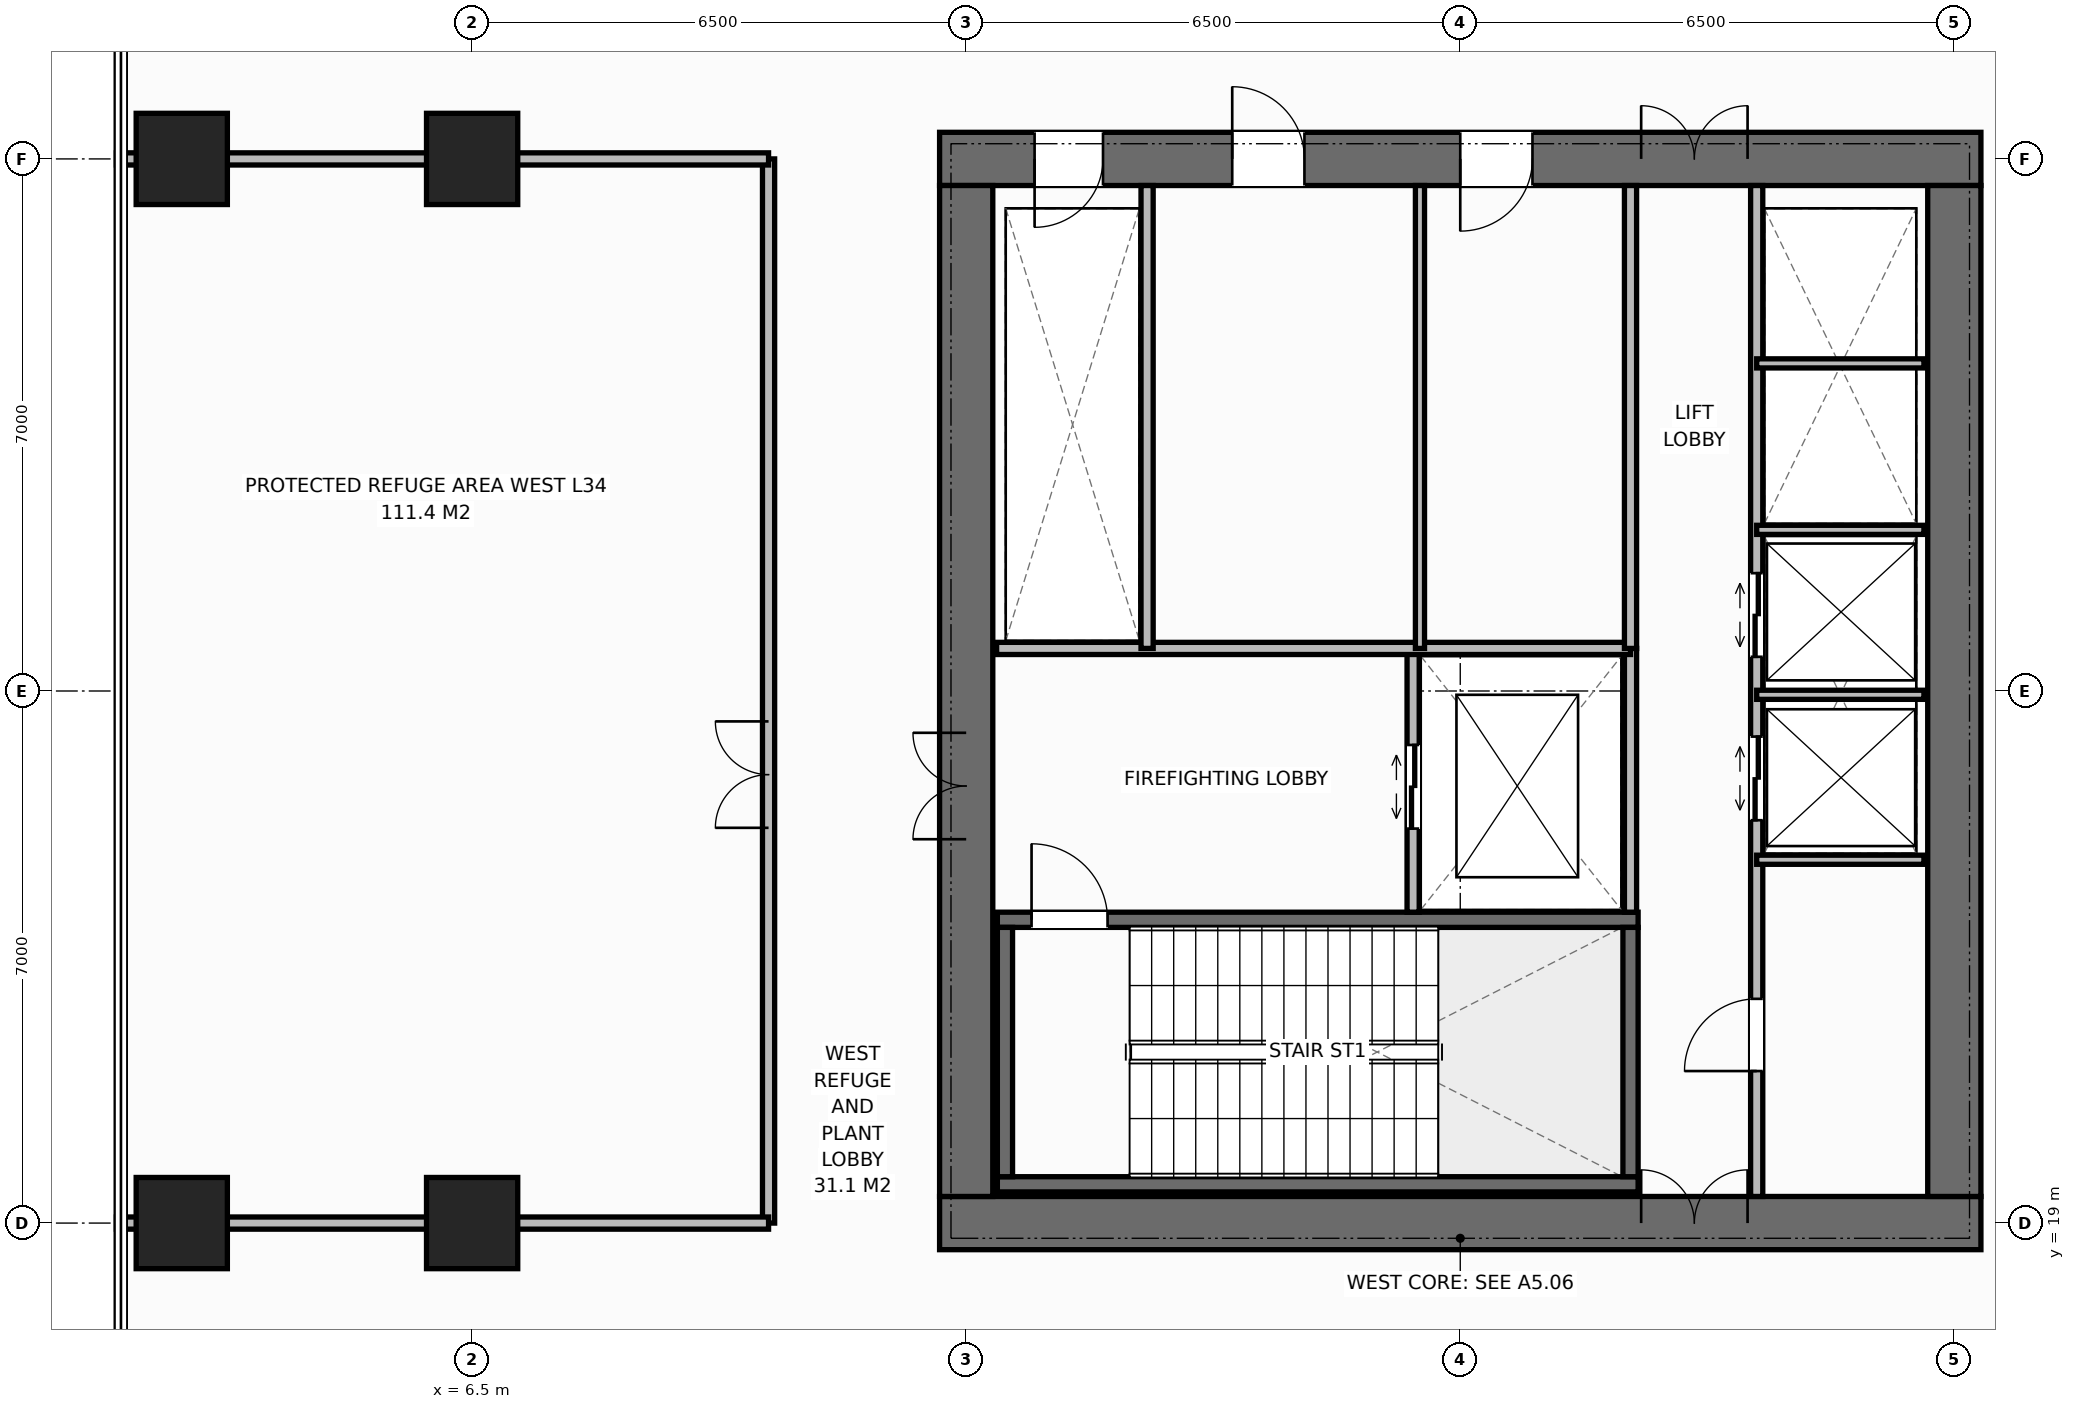
"""IFC4 building model, lengths in metres.
Left out: names, types, materials, properties, quantities, classifications, styles, units other than length and angle.
Written with IfcOpenShell. Run it as: python <this file> out.ifc"""

import sys

from ifc_helpers import new_model, si_unit, direction, frame, frame_2d, origin, origin_2d, place, context, subcontext, project, spatial, rectangle, extrude, element, fill, save


model = new_model("IFC4")
c1 = context("Model", 3, precision=1e-05, world=origin(), true_north=direction((0.0, 1.0)))
c2 = subcontext(c1, "Body", "Model", "MODEL_VIEW")
j1 = project(units=[si_unit("LENGTHUNIT", "METRE"), si_unit("PLANEANGLEUNIT", "RADIAN")], contexts=[c1])
p1 = place(None, origin())
s1 = spatial("IfcSite", under=j1, at=p1, CompositionType="ELEMENT")
p2 = place(p1, origin())
s2 = spatial("IfcBuilding", under=s1, at=p2, CompositionType="ELEMENT")
p3 = place(p2, frame((0.0, 0.0, 139.2)))
s3 = spatial("IfcBuildingStorey", under=s2, at=p3, CompositionType="ELEMENT", Elevation=139.2)
p4 = place(p3, frame((12.65, 19.0, 0.0), z_axis=(0.0, 0.0, 1.0), x_axis=(1.0, 0.0, 0.0)))
e1 = element("IfcWall", 1, at=p4, inside=s3, PredefinedType="SHEAR", context=c2, shape_type="SweptSolid", body=[
    extrude(rectangle(XDim=13.7, YDim=0.7, at=frame_2d((6.85, 0.0))), origin(), (0.0, 0.0, 1.0), 5.0),
])
p5 = place(p4, frame((9.23, 0.0, 0.0)))
e2 = element("IfcOpeningElement", 2, at=p5, cuts=e1, PredefinedType="OPENING", context=c2, shape_type="SweptSolid", body=[
    extrude(rectangle(XDim=1.4, YDim=2.2, at=frame_2d((0.7, 1.1))), frame((0.0, 0.36, 0.0), z_axis=(0.0, -1.0, 0.0), x_axis=(1.0, 0.0, 0.0)), (0.0, 0.0, 1.0), 0.72),
])
p6 = place(p3, frame((12.65, 33.0, 0.0), z_axis=(0.0, 0.0, 1.0), x_axis=(1.0, 0.0, 0.0)))
e3 = element("IfcWall", 3, at=p6, inside=s3, PredefinedType="SHEAR", context=c2, shape_type="SweptSolid", body=[
    extrude(rectangle(XDim=13.7, YDim=0.7, at=frame_2d((6.85, 0.0))), origin(), (0.0, 0.0, 1.0), 5.0),
])
p7 = place(p6, frame((1.25, 0.0, 0.0)))
e4 = element("IfcOpeningElement", 4, at=p7, cuts=e3, PredefinedType="OPENING", context=c2, shape_type="SweptSolid", body=[
    extrude(rectangle(XDim=0.9, YDim=2.15, at=frame_2d((0.45, 1.075))), frame((0.0, 0.36, 0.0), z_axis=(0.0, -1.0, 0.0), x_axis=(1.0, 0.0, 0.0)), (0.0, 0.0, 1.0), 0.72),
])
p8 = place(p6, frame((3.85, 0.0, 0.0)))
e5 = element("IfcOpeningElement", 5, at=p8, cuts=e3, PredefinedType="OPENING", context=c2, shape_type="SweptSolid", body=[
    extrude(rectangle(XDim=0.95, YDim=2.15, at=frame_2d((0.475, 1.075))), frame((0.0, 0.36, 0.0), z_axis=(0.0, -1.0, 0.0), x_axis=(1.0, 0.0, 0.0)), (0.0, 0.0, 1.0), 0.72),
])
p9 = place(p6, frame((6.85, 0.0, 0.0)))
e6 = element("IfcOpeningElement", 6, at=p9, cuts=e3, PredefinedType="OPENING", context=c2, shape_type="SweptSolid", body=[
    extrude(rectangle(XDim=0.95, YDim=2.15, at=frame_2d((0.475, 1.075))), frame((0.0, 0.36, 0.0), z_axis=(0.0, -1.0, 0.0), x_axis=(1.0, 0.0, 0.0)), (0.0, 0.0, 1.0), 0.72),
])
p10 = place(p6, frame((9.23, 0.0, 0.0)))
e7 = element("IfcOpeningElement", 7, at=p10, cuts=e3, PredefinedType="OPENING", context=c2, shape_type="SweptSolid", body=[
    extrude(rectangle(XDim=1.4, YDim=2.2, at=frame_2d((0.7, 1.1))), frame((0.0, 0.36, 0.0), z_axis=(0.0, -1.0, 0.0), x_axis=(1.0, 0.0, 0.0)), (0.0, 0.0, 1.0), 0.72),
])
p11 = place(p3, frame((13.0, 19.35, 0.0), z_axis=(0.0, 0.0, 1.0), x_axis=(0.0, 1.0, 0.0)))
e8 = element("IfcWall", 8, at=p11, inside=s3, PredefinedType="SHEAR", context=c2, shape_type="SweptSolid", body=[
    extrude(rectangle(XDim=13.3, YDim=0.7, at=frame_2d((6.65, 0.0))), origin(), (0.0, 0.0, 1.0), 5.0),
])
p12 = place(p11, frame((4.7, 0.0, 0.0)))
e9 = element("IfcOpeningElement", 9, at=p12, cuts=e8, PredefinedType="OPENING", context=c2, shape_type="SweptSolid", body=[
    extrude(rectangle(XDim=1.4, YDim=2.2, at=frame_2d((0.7, 1.1))), frame((0.0, 0.36, 0.0), z_axis=(0.0, -1.0, 0.0), x_axis=(1.0, 0.0, 0.0)), (0.0, 0.0, 1.0), 0.72),
])
p13 = place(p3, frame((26.0, 19.35, 0.0), z_axis=(0.0, 0.0, 1.0), x_axis=(0.0, 1.0, 0.0)))
e10 = element("IfcWall", 10, at=p13, inside=s3, PredefinedType="SHEAR", context=c2, shape_type="SweptSolid", body=[
    extrude(rectangle(XDim=13.3, YDim=0.7, at=frame_2d((6.65, 0.0))), origin(), (0.0, 0.0, 1.0), 5.0),
])
p14 = place(p3, frame((13.41, 19.51, 0.0), z_axis=(0.0, 0.0, 1.0), x_axis=(1.0, 0.0, 0.0)))
e11 = element("IfcWall", 11, at=p14, inside=s3, PredefinedType="SHEAR", context=c2, shape_type="SweptSolid", body=[
    extrude(rectangle(XDim=8.43, YDim=0.2, at=frame_2d((4.215, 0.0))), origin(), (0.0, 0.0, 1.0), 5.0),
])
p15 = place(p3, frame((13.41, 22.99, 0.0), z_axis=(0.0, 0.0, 1.0), x_axis=(1.0, 0.0, 0.0)))
e12 = element("IfcWall", 12, at=p15, inside=s3, PredefinedType="SHEAR", context=c2, shape_type="SweptSolid", body=[
    extrude(rectangle(XDim=8.43, YDim=0.2, at=frame_2d((4.215, 0.0))), origin(), (0.0, 0.0, 1.0), 5.0),
])
p16 = place(p15, frame((0.45, 0.0, 0.0)))
e13 = element("IfcOpeningElement", 13, at=p16, cuts=e12, PredefinedType="OPENING", context=c2, shape_type="SweptSolid", body=[
    extrude(rectangle(XDim=1.0, YDim=2.15, at=frame_2d((0.5, 1.075))), frame((0.0, 0.11, 0.0), z_axis=(0.0, -1.0, 0.0), x_axis=(1.0, 0.0, 0.0)), (0.0, 0.0, 1.0), 0.22),
])
for number, where, z_axis, x_axis in (
    (14, (13.51, 19.61, 0.0), (0.0, 0.0, 1.0), (0.0, 1.0, 0.0)),
    (15, (21.74, 19.61, 0.0), (0.0, 0.0, 1.0), (0.0, 1.0, 0.0)),
):
    element("IfcWall", number, at=place(p3, frame(where, z_axis=z_axis, x_axis=x_axis)), inside=s3, PredefinedType="SHEAR", context=c2, shape_type="SweptSolid", body=[
        extrude(rectangle(XDim=3.28, YDim=0.2, at=frame_2d((1.64, 0.0))), origin(), (0.0, 0.0, 1.0), 5.0),
    ])
for number, where, z_axis, x_axis in (
    (16, (6.5, 19.0, 0.0), (0.0, 0.0, 1.0), (1.0, 0.0, 0.0)),
    (17, (6.5, 33.0, 0.0), (0.0, 0.0, 1.0), (1.0, 0.0, 0.0)),
    (18, (2.68, 19.0, 0.0), (0.0, 0.0, 1.0), (1.0, 0.0, 0.0)),
    (19, (2.68, 33.0, 0.0), (0.0, 0.0, 1.0), (1.0, 0.0, 0.0)),
):
    element("IfcColumn", number, at=place(p3, frame(where, z_axis=z_axis, x_axis=x_axis)), inside=s3, PredefinedType="COLUMN", context=c2, shape_type="SweptSolid", body=[
        extrude(rectangle(XDim=1.2, YDim=1.2, at=origin_2d()), origin(), (0.0, 0.0, 1.0), 5.0),
    ])
p17 = place(p3, frame((21.74, 23.09, 0.0), z_axis=(0.0, 0.0, 1.0), x_axis=(0.0, 1.0, 0.0)))
e20 = element("IfcWall", 20, at=p17, inside=s3, PredefinedType="STANDARD", context=c2, shape_type="SweptSolid", body=[
    extrude(rectangle(XDim=3.47, YDim=0.16, at=frame_2d((1.735, 0.0))), origin(), (0.0, 0.0, 1.0), 4.772),
])
p18 = place(p3, frame((18.88, 23.09, 0.0), z_axis=(0.0, 0.0, 1.0), x_axis=(0.0, 1.0, 0.0)))
e21 = element("IfcWall", 21, at=p18, inside=s3, PredefinedType="STANDARD", context=c2, shape_type="SweptSolid", body=[
    extrude(rectangle(XDim=3.47, YDim=0.16, at=frame_2d((1.735, 0.0))), origin(), (0.0, 0.0, 1.0), 4.772),
])
p19 = place(p18, frame((1.1, 0.0, 0.0)))
e22 = element("IfcOpeningElement", 22, at=p19, cuts=e21, PredefinedType="OPENING", context=c2, shape_type="SweptSolid", body=[
    extrude(rectangle(XDim=1.1, YDim=2.2, at=frame_2d((0.55, 1.1))), frame((0.0, 0.09, 0.0), z_axis=(0.0, -1.0, 0.0), x_axis=(1.0, 0.0, 0.0)), (0.0, 0.0, 1.0), 0.18),
])
p20 = place(p3, frame((13.4, 26.56, 0.0), z_axis=(0.0, 0.0, 1.0), x_axis=(1.0, 0.0, 0.0)))
e23 = element("IfcWall", 23, at=p20, inside=s3, PredefinedType="STANDARD", context=c2, shape_type="SweptSolid", body=[
    extrude(rectangle(XDim=8.34, YDim=0.16, at=frame_2d((4.17, 0.0))), origin(), (0.0, 0.0, 1.0), 4.772),
])
p21 = place(p3, frame((15.38, 26.56, 0.0), z_axis=(0.0, 0.0, 1.0), x_axis=(0.0, 1.0, 0.0)))
e24 = element("IfcWall", 24, at=p21, inside=s3, PredefinedType="STANDARD", context=c2, shape_type="SweptSolid", body=[
    extrude(rectangle(XDim=6.09, YDim=0.16, at=frame_2d((3.045, 0.0))), origin(), (0.0, 0.0, 1.0), 4.772),
])
p22 = place(p3, frame((18.97, 26.56, 0.0), z_axis=(0.0, 0.0, 1.0), x_axis=(0.0, 1.0, 0.0)))
e25 = element("IfcWall", 25, at=p22, inside=s3, PredefinedType="PARTITIONING", context=c2, shape_type="SweptSolid", body=[
    extrude(rectangle(XDim=6.09, YDim=0.12, at=frame_2d((3.045, 0.0))), origin(), (0.0, 0.0, 1.0), 4.772),
])
p23 = place(p3, frame((21.74, 26.56, 0.0), z_axis=(0.0, 0.0, 1.0), x_axis=(0.0, 1.0, 0.0)))
e26 = element("IfcWall", 26, at=p23, inside=s3, PredefinedType="STANDARD", context=c2, shape_type="SweptSolid", body=[
    extrude(rectangle(XDim=6.09, YDim=0.16, at=frame_2d((3.045, 0.0))), origin(), (0.0, 0.0, 1.0), 4.772),
])
p24 = place(p3, frame((23.4, 19.35, 0.0), z_axis=(0.0, 0.0, 1.0), x_axis=(0.0, 1.0, 0.0)))
e27 = element("IfcWall", 27, at=p24, inside=s3, PredefinedType="STANDARD", context=c2, shape_type="SweptSolid", body=[
    extrude(rectangle(XDim=13.3, YDim=0.16, at=frame_2d((6.65, 0.0))), origin(), (0.0, 0.0, 1.0), 4.772),
])
p25 = place(p24, frame((1.65, 0.0, 0.0)))
e28 = element("IfcOpeningElement", 28, at=p25, cuts=e27, PredefinedType="OPENING", context=c2, shape_type="SweptSolid", body=[
    extrude(rectangle(XDim=0.95, YDim=2.15, at=frame_2d((0.475, 1.075))), frame((0.0, 0.09, 0.0), z_axis=(0.0, -1.0, 0.0), x_axis=(1.0, 0.0, 0.0)), (0.0, 0.0, 1.0), 0.18),
])
p26 = place(p24, frame((4.95, 0.0, 0.0)))
e29 = element("IfcOpeningElement", 29, at=p26, cuts=e27, PredefinedType="OPENING", context=c2, shape_type="SweptSolid", body=[
    extrude(rectangle(XDim=1.1, YDim=2.2, at=frame_2d((0.55, 1.1))), frame((0.0, 0.09, 0.0), z_axis=(0.0, -1.0, 0.0), x_axis=(1.0, 0.0, 0.0)), (0.0, 0.0, 1.0), 0.18),
])
p27 = place(p24, frame((7.1, 0.0, 0.0)))
e30 = element("IfcOpeningElement", 30, at=p27, cuts=e27, PredefinedType="OPENING", context=c2, shape_type="SweptSolid", body=[
    extrude(rectangle(XDim=1.1, YDim=2.2, at=frame_2d((0.55, 1.1))), frame((0.0, 0.09, 0.0), z_axis=(0.0, -1.0, 0.0), x_axis=(1.0, 0.0, 0.0)), (0.0, 0.0, 1.0), 0.18),
])
for number, where, z_axis, x_axis in (
    (31, (23.4, 23.78, 0.0), (0.0, 0.0, 1.0), (1.0, 0.0, 0.0)),
    (32, (23.4, 25.95, 0.0), (0.0, 0.0, 1.0), (1.0, 0.0, 0.0)),
    (33, (23.4, 28.12, 0.0), (0.0, 0.0, 1.0), (1.0, 0.0, 0.0)),
    (34, (23.4, 30.31, 0.0), (0.0, 0.0, 1.0), (1.0, 0.0, 0.0)),
):
    element("IfcWall", number, at=place(p3, frame(where, z_axis=z_axis, x_axis=x_axis)), inside=s3, PredefinedType="PARTITIONING", context=c2, shape_type="SweptSolid", body=[
        extrude(rectangle(XDim=2.2, YDim=0.12, at=frame_2d((1.1, 0.0))), origin(), (0.0, 0.0, 1.0), 4.772),
    ])
p28 = place(p3, frame((10.4, 19.0, 0.0), z_axis=(0.0, 0.0, 1.0), x_axis=(0.0, 1.0, 0.0)))
e35 = element("IfcWall", 35, at=p28, inside=s3, PredefinedType="STANDARD", context=c2, shape_type="SweptSolid", body=[
    extrude(rectangle(XDim=14.0, YDim=0.16, at=frame_2d((7.0, 0.0))), origin(), (0.0, 0.0, 1.0), 4.772),
])
p29 = place(p28, frame((5.2, 0.0, 0.0)))
e36 = element("IfcOpeningElement", 36, at=p29, cuts=e35, PredefinedType="OPENING", context=c2, shape_type="SweptSolid", body=[
    extrude(rectangle(XDim=1.4, YDim=2.2, at=frame_2d((0.7, 1.1))), frame((0.0, 0.09, 0.0), z_axis=(0.0, -1.0, 0.0), x_axis=(1.0, 0.0, 0.0)), (0.0, 0.0, 1.0), 0.18),
])
for number, where, z_axis, x_axis in (
    (37, (1.82, 19.0, 0.0), (0.0, 0.0, 1.0), (1.0, 0.0, 0.0)),
    (38, (1.82, 33.0, 0.0), (0.0, 0.0, 1.0), (1.0, 0.0, 0.0)),
):
    element("IfcWall", number, at=place(p3, frame(where, z_axis=z_axis, x_axis=x_axis)), inside=s3, PredefinedType="STANDARD", context=c2, shape_type="SweptSolid", body=[
        extrude(rectangle(XDim=8.58, YDim=0.16, at=frame_2d((4.29, 0.0))), origin(), (0.0, 0.0, 1.0), 3.252),
    ])
p30 = place(p16, origin())
e39 = element("IfcDoor", 39, at=p30, inside=s3, OperationType="SINGLE_SWING_LEFT", PredefinedType="DOOR", context=c2, shape_type="SweptSolid", body=[
    extrude(rectangle(XDim=1.0, YDim=2.15, at=frame_2d((0.5, 1.075))), frame((0.0, 0.025, 0.0), z_axis=(0.0, -1.0, 0.0), x_axis=(1.0, 0.0, 0.0)), (0.0, 0.0, 1.0), 0.05),
])
fill(e13, e39)
p31 = place(p12, origin())
e40 = element("IfcDoor", 40, at=p31, inside=s3, OperationType="DOUBLE_DOOR_SINGLE_SWING", PredefinedType="DOOR", context=c2, shape_type="SweptSolid", body=[
    extrude(rectangle(XDim=1.4, YDim=2.2, at=frame_2d((0.7, 1.1))), frame((0.0, 0.025, 0.0), z_axis=(0.0, -1.0, 0.0), x_axis=(1.0, 0.0, 0.0)), (0.0, 0.0, 1.0), 0.05),
])
fill(e9, e40)
p32 = place(p19, origin())
e41 = element("IfcDoor", 41, at=p32, inside=s3, OperationType="DOUBLE_DOOR_SLIDING", PredefinedType="DOOR", context=c2, shape_type="SweptSolid", body=[
    extrude(rectangle(XDim=1.1, YDim=2.2, at=frame_2d((0.55, 1.1))), frame((0.0, 0.025, 0.0), z_axis=(0.0, -1.0, 0.0), x_axis=(1.0, 0.0, 0.0)), (0.0, 0.0, 1.0), 0.05),
])
fill(e22, e41)
p33 = place(p7, origin())
e42 = element("IfcDoor", 42, at=p33, inside=s3, OperationType="SINGLE_SWING_RIGHT", PredefinedType="DOOR", context=c2, shape_type="SweptSolid", body=[
    extrude(rectangle(XDim=0.9, YDim=2.15, at=frame_2d((0.45, 1.075))), frame((0.0, -0.075, 0.0), z_axis=(0.0, -1.0, 0.0), x_axis=(1.0, 0.0, 0.0)), (0.0, 0.0, 1.0), 0.05),
])
fill(e4, e42)
p34 = place(p8, origin())
e43 = element("IfcDoor", 43, at=p34, inside=s3, OperationType="SINGLE_SWING_LEFT", PredefinedType="DOOR", context=c2, shape_type="SweptSolid", body=[
    extrude(rectangle(XDim=0.95, YDim=2.15, at=frame_2d((0.475, 1.075))), frame((0.0, -0.075, 0.0), z_axis=(0.0, -1.0, 0.0), x_axis=(1.0, 0.0, 0.0)), (0.0, 0.0, 1.0), 0.05),
])
fill(e5, e43)
p35 = place(p9, origin())
e44 = element("IfcDoor", 44, at=p35, inside=s3, OperationType="SINGLE_SWING_RIGHT", PredefinedType="DOOR", context=c2, shape_type="SweptSolid", body=[
    extrude(rectangle(XDim=0.95, YDim=2.15, at=frame_2d((0.475, 1.075))), frame((0.0, -0.075, 0.0), z_axis=(0.0, -1.0, 0.0), x_axis=(1.0, 0.0, 0.0)), (0.0, 0.0, 1.0), 0.05),
])
fill(e6, e44)
p36 = place(p5, origin())
e45 = element("IfcDoor", 45, at=p36, inside=s3, OperationType="DOUBLE_DOOR_SINGLE_SWING", PredefinedType="DOOR", context=c2, shape_type="SweptSolid", body=[
    extrude(rectangle(XDim=1.4, YDim=2.2, at=frame_2d((0.7, 1.1))), frame((0.0, 0.125, 0.0), z_axis=(0.0, -1.0, 0.0), x_axis=(1.0, 0.0, 0.0)), (0.0, 0.0, 1.0), 0.05),
])
fill(e2, e45)
p37 = place(p10, origin())
e46 = element("IfcDoor", 46, at=p37, inside=s3, OperationType="DOUBLE_DOOR_SINGLE_SWING", PredefinedType="DOOR", context=c2, shape_type="SweptSolid", body=[
    extrude(rectangle(XDim=1.4, YDim=2.2, at=frame_2d((0.7, 1.1))), frame((0.0, -0.075, 0.0), z_axis=(0.0, -1.0, 0.0), x_axis=(1.0, 0.0, 0.0)), (0.0, 0.0, 1.0), 0.05),
])
fill(e7, e46)
p38 = place(p25, origin())
e47 = element("IfcDoor", 47, at=p38, inside=s3, OperationType="SINGLE_SWING_LEFT", PredefinedType="DOOR", context=c2, shape_type="SweptSolid", body=[
    extrude(rectangle(XDim=0.95, YDim=2.15, at=frame_2d((0.475, 1.075))), frame((0.0, 0.025, 0.0), z_axis=(0.0, -1.0, 0.0), x_axis=(1.0, 0.0, 0.0)), (0.0, 0.0, 1.0), 0.05),
])
fill(e28, e47)
p39 = place(p26, origin())
e48 = element("IfcDoor", 48, at=p39, inside=s3, OperationType="DOUBLE_DOOR_SLIDING", PredefinedType="DOOR", context=c2, shape_type="SweptSolid", body=[
    extrude(rectangle(XDim=1.1, YDim=2.2, at=frame_2d((0.55, 1.1))), frame((0.0, 0.025, 0.0), z_axis=(0.0, -1.0, 0.0), x_axis=(1.0, 0.0, 0.0)), (0.0, 0.0, 1.0), 0.05),
])
fill(e29, e48)
p40 = place(p27, origin())
e49 = element("IfcDoor", 49, at=p40, inside=s3, OperationType="DOUBLE_DOOR_SLIDING", PredefinedType="DOOR", context=c2, shape_type="SweptSolid", body=[
    extrude(rectangle(XDim=1.1, YDim=2.2, at=frame_2d((0.55, 1.1))), frame((0.0, 0.025, 0.0), z_axis=(0.0, -1.0, 0.0), x_axis=(1.0, 0.0, 0.0)), (0.0, 0.0, 1.0), 0.05),
])
fill(e30, e49)
p41 = place(p29, origin())
e50 = element("IfcDoor", 50, at=p41, inside=s3, OperationType="DOUBLE_DOOR_SINGLE_SWING", PredefinedType="DOOR", context=c2, shape_type="SweptSolid", body=[
    extrude(rectangle(XDim=1.4, YDim=2.2, at=frame_2d((0.7, 1.1))), frame((0.0, 0.025, 0.0), z_axis=(0.0, -1.0, 0.0), x_axis=(1.0, 0.0, 0.0)), (0.0, 0.0, 1.0), 0.05),
])
fill(e36, e50)
save(model, sys.argv[1])
